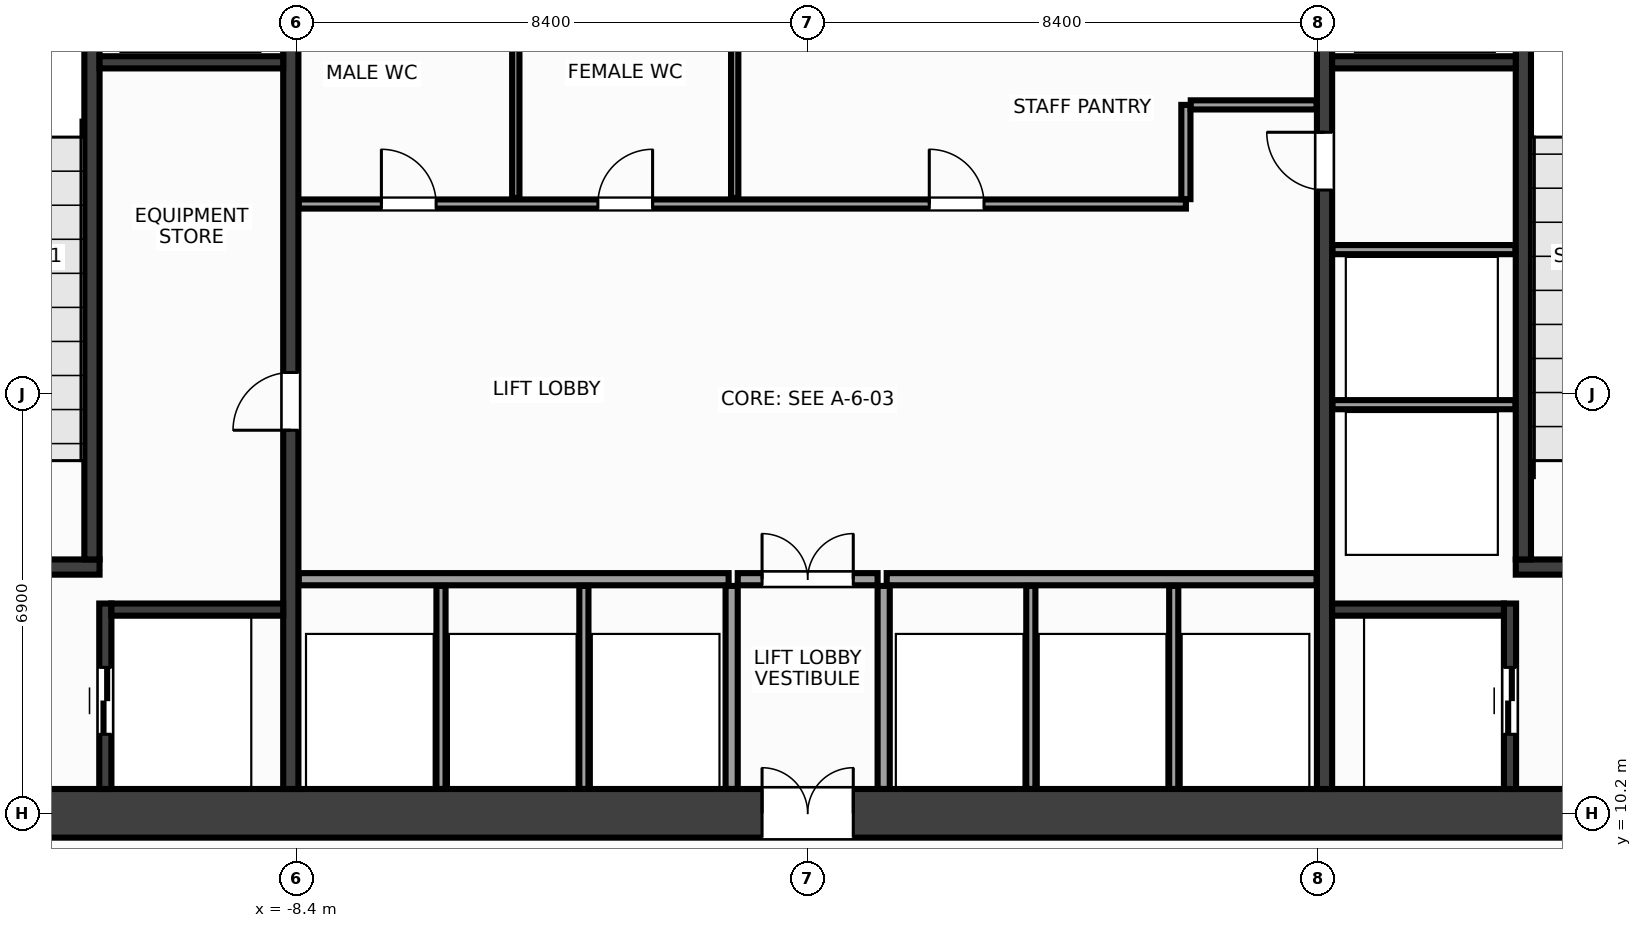
"""IFC4 building model, lengths in metres.
Left out: names, types, materials, properties, quantities, classifications, styles, units other than length and angle.
Written with IfcOpenShell. Run it as: python <this file> out.ifc"""

import sys

from ifc_helpers import new_model, si_unit, direction, frame, frame_2d, origin, place, context, subcontext, project, spatial, rectangle, extrude, source, transform, mapped, element, fill, save


model = new_model("IFC4")
c1 = context("Model", 3, precision=1e-05, world=origin(), true_north=direction((0.0, 1.0)))
c2 = subcontext(c1, "Body", "Model", "MODEL_VIEW")
j1 = project(units=[si_unit("LENGTHUNIT", "METRE"), si_unit("PLANEANGLEUNIT", "RADIAN")], contexts=[c1])
p1 = place(None, origin())
s1 = spatial("IfcSite", under=j1, at=p1, CompositionType="ELEMENT")
p2 = place(p1, origin())
s2 = spatial("IfcBuilding", under=s1, at=p2, CompositionType="ELEMENT")
p3 = place(p2, frame((0.0, 0.0, 70.4)))
s3 = spatial("IfcBuildingStorey", under=s2, at=p3, CompositionType="ELEMENT", Elevation=70.4)
m1 = source(origin(), c2, "Body", "SweptSolid", [
    extrude(rectangle(XDim=32.0, YDim=0.8, at=frame_2d((16.0, 0.0))), origin(), (0.0, 0.0, 1.0), 7.2),
])
p4 = place(p3, frame((-16.0, 10.2, 0.0), z_axis=(0.0, 0.0, 1.0), x_axis=(1.0, 0.0, 0.0)))
e1 = element("IfcWall", 1, at=p4, inside=s3, PredefinedType="SHEAR", context=c2, shape_type="MappedRepresentation", body=[
    mapped(m1, transform((0.0, 0.0, 0.0), x_axis=(1.0, 0.0, 0.0), y_axis=(0.0, 1.0, 0.0), z_axis=(0.0, 0.0, 1.0), scale=1.0)),
])
p5 = place(p4, frame((1.85, 0.0, 0.0)))
e2 = element("IfcOpeningElement", 2, at=p5, cuts=e1, PredefinedType="OPENING", context=c2, shape_type="SweptSolid", body=[
    extrude(rectangle(XDim=1.6, YDim=2.15, at=frame_2d((0.8, 1.075))), frame((0.0, 0.412, 0.0), z_axis=(0.0, -1.0, 0.0), x_axis=(1.0, 0.0, 0.0)), (0.0, 0.0, 1.0), 0.824),
])
p6 = place(p4, frame((28.55, 0.0, 0.0)))
e3 = element("IfcOpeningElement", 3, at=p6, cuts=e1, PredefinedType="OPENING", context=c2, shape_type="SweptSolid", body=[
    extrude(rectangle(XDim=1.6, YDim=2.15, at=frame_2d((0.8, 1.075))), frame((0.0, 0.412, 0.0), z_axis=(0.0, -1.0, 0.0), x_axis=(1.0, 0.0, 0.0)), (0.0, 0.0, 1.0), 0.824),
])
p7 = place(p4, frame((15.25, 0.0, 0.0)))
e4 = element("IfcOpeningElement", 4, at=p7, cuts=e1, PredefinedType="OPENING", context=c2, shape_type="SweptSolid", body=[
    extrude(rectangle(XDim=1.5, YDim=2.2, at=frame_2d((0.75, 1.1))), frame((0.0, 0.412, 0.0), z_axis=(0.0, -1.0, 0.0), x_axis=(1.0, 0.0, 0.0)), (0.0, 0.0, 1.0), 0.824),
])
m2 = source(origin(), c2, "Body", "SweptSolid", [
    extrude(rectangle(XDim=12.8, YDim=0.25, at=frame_2d((6.4, 0.0))), origin(), (0.0, 0.0, 1.0), 7.2),
])
p8 = place(p3, frame((-8.5, 10.6, 0.0), z_axis=(0.0, 0.0, 1.0), x_axis=(0.0, 1.0, 0.0)))
e5 = element("IfcWall", 5, at=p8, inside=s3, PredefinedType="SHEAR", context=c2, shape_type="MappedRepresentation", body=[
    mapped(m2, transform((0.0, 0.0, 0.0), x_axis=(1.0, 0.0, 0.0), y_axis=(0.0, 1.0, 0.0), z_axis=(0.0, 0.0, 1.0), scale=1.0)),
])
p9 = place(p8, frame((5.9, 0.0, 0.0)))
e6 = element("IfcOpeningElement", 6, at=p9, cuts=e5, PredefinedType="OPENING", context=c2, shape_type="SweptSolid", body=[
    extrude(rectangle(XDim=0.95, YDim=2.15, at=frame_2d((0.475, 1.075))), frame((0.0, 0.137, 0.0), z_axis=(0.0, -1.0, 0.0), x_axis=(1.0, 0.0, 0.0)), (0.0, 0.0, 1.0), 0.274),
])
p10 = place(p3, frame((8.5, 10.6, 0.0), z_axis=(0.0, 0.0, 1.0), x_axis=(0.0, 1.0, 0.0)))
e7 = element("IfcWall", 7, at=p10, inside=s3, PredefinedType="SHEAR", context=c2, shape_type="MappedRepresentation", body=[
    mapped(m2, transform((0.0, 0.0, 0.0), x_axis=(1.0, 0.0, 0.0), y_axis=(0.0, 1.0, 0.0), z_axis=(0.0, 0.0, 1.0), scale=1.0)),
])
p11 = place(p10, frame((9.85, 0.0, 0.0)))
e8 = element("IfcOpeningElement", 8, at=p11, cuts=e7, PredefinedType="OPENING", context=c2, shape_type="SweptSolid", body=[
    extrude(rectangle(XDim=0.95, YDim=2.15, at=frame_2d((0.475, 1.075))), frame((0.0, 0.137, 0.0), z_axis=(0.0, -1.0, 0.0), x_axis=(1.0, 0.0, 0.0)), (0.0, 0.0, 1.0), 0.274),
])
m3 = source(origin(), c2, "Body", "SweptSolid", [
    extrude(rectangle(XDim=3.555, YDim=0.25, at=frame_2d((1.777, 0.0))), origin(), (0.0, 0.0, 1.0), 7.2),
])
p12 = place(p3, frame((-15.2, 14.25, 0.0), z_axis=(0.0, 0.0, 1.0), x_axis=(1.0, 0.0, 0.0)))
e9 = element("IfcWall", 9, at=p12, inside=s3, PredefinedType="SHEAR", context=c2, shape_type="MappedRepresentation", body=[
    mapped(m3, transform((0.0, 0.0, 0.0), x_axis=(1.0, 0.0, 0.0), y_axis=(0.0, 1.0, 0.0), z_axis=(0.0, 0.0, 1.0), scale=1.0)),
])
p13 = place(p12, frame((0.95, 0.0, 0.0)))
e10 = element("IfcOpeningElement", 10, at=p13, cuts=e9, PredefinedType="OPENING", context=c2, shape_type="SweptSolid", body=[
    extrude(rectangle(XDim=1.6, YDim=2.15, at=frame_2d((0.8, 1.075))), frame((0.0, 0.137, 0.0), z_axis=(0.0, -1.0, 0.0), x_axis=(1.0, 0.0, 0.0)), (0.0, 0.0, 1.0), 0.274),
])
m4 = source(origin(), c2, "Body", "SweptSolid", [
    extrude(rectangle(XDim=9.025, YDim=0.25, at=frame_2d((4.512, 0.0))), origin(), (0.0, 0.0, 1.0), 7.2),
])
p14 = place(p3, frame((-11.77, 14.375, 0.0), z_axis=(0.0, 0.0, 1.0), x_axis=(0.0, 1.0, 0.0)))
e11 = element("IfcWall", 11, at=p14, inside=s3, PredefinedType="SHEAR", context=c2, shape_type="MappedRepresentation", body=[
    mapped(m4, transform((0.0, 0.0, 0.0), x_axis=(1.0, 0.0, 0.0), y_axis=(0.0, 1.0, 0.0), z_axis=(0.0, 0.0, 1.0), scale=1.0)),
])
p15 = place(p3, frame((11.645, 14.25, 0.0), z_axis=(0.0, 0.0, 1.0), x_axis=(1.0, 0.0, 0.0)))
e12 = element("IfcWall", 12, at=p15, inside=s3, PredefinedType="SHEAR", context=c2, shape_type="MappedRepresentation", body=[
    mapped(m3, transform((0.0, 0.0, 0.0), x_axis=(1.0, 0.0, 0.0), y_axis=(0.0, 1.0, 0.0), z_axis=(0.0, 0.0, 1.0), scale=1.0)),
])
p16 = place(p15, frame((0.95, 0.0, 0.0)))
e13 = element("IfcOpeningElement", 13, at=p16, cuts=e12, PredefinedType="OPENING", context=c2, shape_type="SweptSolid", body=[
    extrude(rectangle(XDim=1.6, YDim=2.15, at=frame_2d((0.8, 1.075))), frame((0.0, 0.137, 0.0), z_axis=(0.0, -1.0, 0.0), x_axis=(1.0, 0.0, 0.0)), (0.0, 0.0, 1.0), 0.274),
])
p17 = place(p3, frame((11.77, 14.375, 0.0), z_axis=(0.0, 0.0, 1.0), x_axis=(0.0, 1.0, 0.0)))
e14 = element("IfcWall", 14, at=p17, inside=s3, PredefinedType="SHEAR", context=c2, shape_type="MappedRepresentation", body=[
    mapped(m4, transform((0.0, 0.0, 0.0), x_axis=(1.0, 0.0, 0.0), y_axis=(0.0, 1.0, 0.0), z_axis=(0.0, 0.0, 1.0), scale=1.0)),
])
m5 = source(origin(), c2, "Body", "SweptSolid", [
    extrude(rectangle(XDim=3.05, YDim=0.2, at=frame_2d((1.525, 0.0))), origin(), (0.0, 0.0, 1.0), 7.2),
])
p18 = place(p3, frame((-11.55, 10.6, 0.0), z_axis=(0.0, 0.0, 1.0), x_axis=(0.0, 1.0, 0.0)))
e15 = element("IfcWall", 15, at=p18, inside=s3, PredefinedType="SHEAR", context=c2, shape_type="MappedRepresentation", body=[
    mapped(m5, transform((0.0, 0.0, 0.0), x_axis=(1.0, 0.0, 0.0), y_axis=(0.0, 1.0, 0.0), z_axis=(0.0, 0.0, 1.0), scale=1.0)),
])
p19 = place(p18, frame((0.9, 0.0, 0.0)))
e16 = element("IfcOpeningElement", 16, at=p19, cuts=e15, PredefinedType="OPENING", context=c2, shape_type="SweptSolid", body=[
    extrude(rectangle(XDim=1.1, YDim=2.15, at=frame_2d((0.55, 1.075))), frame((0.0, 0.112, 0.0), z_axis=(0.0, -1.0, 0.0), x_axis=(1.0, 0.0, 0.0)), (0.0, 0.0, 1.0), 0.224),
])
m6 = source(origin(), c2, "Body", "SweptSolid", [
    extrude(rectangle(XDim=2.825, YDim=0.2, at=frame_2d((1.413, 0.0))), origin(), (0.0, 0.0, 1.0), 7.2),
])
p20 = place(p3, frame((-11.45, 13.55, 0.0), z_axis=(0.0, 0.0, 1.0), x_axis=(1.0, 0.0, 0.0)))
e17 = element("IfcWall", 17, at=p20, inside=s3, PredefinedType="SHEAR", context=c2, shape_type="MappedRepresentation", body=[
    mapped(m6, transform((0.0, 0.0, 0.0), x_axis=(1.0, 0.0, 0.0), y_axis=(0.0, 1.0, 0.0), z_axis=(0.0, 0.0, 1.0), scale=1.0)),
])
p21 = place(p3, frame((11.55, 10.6, 0.0), z_axis=(0.0, 0.0, 1.0), x_axis=(0.0, 1.0, 0.0)))
e18 = element("IfcWall", 18, at=p21, inside=s3, PredefinedType="SHEAR", context=c2, shape_type="MappedRepresentation", body=[
    mapped(m5, transform((0.0, 0.0, 0.0), x_axis=(1.0, 0.0, 0.0), y_axis=(0.0, 1.0, 0.0), z_axis=(0.0, 0.0, 1.0), scale=1.0)),
])
p22 = place(p21, frame((0.9, 0.0, 0.0)))
e19 = element("IfcOpeningElement", 19, at=p22, cuts=e18, PredefinedType="OPENING", context=c2, shape_type="SweptSolid", body=[
    extrude(rectangle(XDim=1.1, YDim=2.15, at=frame_2d((0.55, 1.075))), frame((0.0, 0.112, 0.0), z_axis=(0.0, -1.0, 0.0), x_axis=(1.0, 0.0, 0.0)), (0.0, 0.0, 1.0), 0.224),
])
p23 = place(p3, frame((8.625, 13.55, 0.0), z_axis=(0.0, 0.0, 1.0), x_axis=(1.0, 0.0, 0.0)))
e20 = element("IfcWall", 20, at=p23, inside=s3, PredefinedType="SHEAR", context=c2, shape_type="MappedRepresentation", body=[
    mapped(m6, transform((0.0, 0.0, 0.0), x_axis=(1.0, 0.0, 0.0), y_axis=(0.0, 1.0, 0.0), z_axis=(0.0, 0.0, 1.0), scale=1.0)),
])
m7 = source(origin(), c2, "Body", "SweptSolid", [
    extrude(rectangle(XDim=3.02, YDim=0.2, at=frame_2d((1.51, 0.0))), origin(), (0.0, 0.0, 1.0), 7.2),
])
for number, where, z_axis, x_axis in (
    (21, (-11.645, 22.55, 0.0), (0.0, 0.0, 1.0), (1.0, 0.0, 0.0)),
    (22, (8.625, 22.55, 0.0), (0.0, 0.0, 1.0), (1.0, 0.0, 0.0)),
):
    element("IfcWall", number, at=place(p3, frame(where, z_axis=z_axis, x_axis=x_axis)), inside=s3, PredefinedType="SHEAR", context=c2, shape_type="MappedRepresentation", body=[
        mapped(m7, transform((0.0, 0.0, 0.0), x_axis=(1.0, 0.0, 0.0), y_axis=(0.0, 1.0, 0.0), z_axis=(0.0, 0.0, 1.0), scale=1.0)),
    ])
m8 = source(origin(), c2, "Body", "SweptSolid", [
    extrude(rectangle(XDim=3.01, YDim=0.15, at=frame_2d((1.505, 0.0))), origin(), (0.0, 0.0, 1.0), 6.9),
])
for number, where, z_axis, x_axis in (
    (23, (8.63, 16.92, 0.0), (0.0, 0.0, 1.0), (1.0, 0.0, 0.0)),
    (24, (8.63, 19.47, 0.0), (0.0, 0.0, 1.0), (1.0, 0.0, 0.0)),
):
    element("IfcWall", number, at=place(p3, frame(where, z_axis=z_axis, x_axis=x_axis)), inside=s3, PredefinedType="PARTITIONING", context=c2, shape_type="MappedRepresentation", body=[
        mapped(m8, transform((0.0, 0.0, 0.0), x_axis=(1.0, 0.0, 0.0), y_axis=(0.0, 1.0, 0.0), z_axis=(0.0, 0.0, 1.0), scale=1.0)),
    ])
m9 = source(origin(), c2, "Body", "SweptSolid", [
    extrude(rectangle(XDim=7.07, YDim=0.2, at=frame_2d((3.535, 0.0))), origin(), (0.0, 0.0, 1.0), 6.9),
])
for number, where, z_axis, x_axis in (
    (25, (-8.37, 14.05, 0.0), (0.0, 0.0, 1.0), (1.0, 0.0, 0.0)),
    (26, (1.3, 14.05, 0.0), (0.0, 0.0, 1.0), (1.0, 0.0, 0.0)),
):
    element("IfcWall", number, at=place(p3, frame(where, z_axis=z_axis, x_axis=x_axis)), inside=s3, PredefinedType="PARTITIONING", context=c2, shape_type="MappedRepresentation", body=[
        mapped(m9, transform((0.0, 0.0, 0.0), x_axis=(1.0, 0.0, 0.0), y_axis=(0.0, 1.0, 0.0), z_axis=(0.0, 0.0, 1.0), scale=1.0)),
    ])
m10 = source(origin(), c2, "Body", "SweptSolid", [
    extrude(rectangle(XDim=3.34, YDim=0.2, at=frame_2d((1.67, 0.0))), origin(), (0.0, 0.0, 1.0), 6.9),
])
for number, where, z_axis, x_axis in (
    (27, (-1.25, 10.6, 0.0), (0.0, 0.0, 1.0), (0.0, 1.0, 0.0)),
    (28, (1.25, 10.6, 0.0), (0.0, 0.0, 1.0), (0.0, 1.0, 0.0)),
):
    element("IfcWall", number, at=place(p3, frame(where, z_axis=z_axis, x_axis=x_axis)), inside=s3, PredefinedType="PARTITIONING", context=c2, shape_type="MappedRepresentation", body=[
        mapped(m10, transform((0.0, 0.0, 0.0), x_axis=(1.0, 0.0, 0.0), y_axis=(0.0, 1.0, 0.0), z_axis=(0.0, 0.0, 1.0), scale=1.0)),
    ])
m11 = source(origin(), c2, "Body", "SweptSolid", [
    extrude(rectangle(XDim=2.3, YDim=0.2, at=frame_2d((1.15, 0.0))), origin(), (0.0, 0.0, 1.0), 6.9),
])
p24 = place(p3, frame((-1.15, 14.05, 0.0), z_axis=(0.0, 0.0, 1.0), x_axis=(1.0, 0.0, 0.0)))
e29 = element("IfcWall", 29, at=p24, inside=s3, PredefinedType="PARTITIONING", context=c2, shape_type="MappedRepresentation", body=[
    mapped(m11, transform((0.0, 0.0, 0.0), x_axis=(1.0, 0.0, 0.0), y_axis=(0.0, 1.0, 0.0), z_axis=(0.0, 0.0, 1.0), scale=1.0)),
])
p25 = place(p24, frame((0.4, 0.0, 0.0)))
e30 = element("IfcOpeningElement", 30, at=p25, cuts=e29, PredefinedType="OPENING", context=c2, shape_type="SweptSolid", body=[
    extrude(rectangle(XDim=1.5, YDim=2.2, at=frame_2d((0.75, 1.1))), frame((0.0, 0.112, 0.0), z_axis=(0.0, -1.0, 0.0), x_axis=(1.0, 0.0, 0.0)), (0.0, 0.0, 1.0), 0.224),
])
m12 = source(origin(), c2, "Body", "SweptSolid", [
    extrude(rectangle(XDim=14.59, YDim=0.15, at=frame_2d((7.295, 0.0))), origin(), (0.0, 0.0, 1.0), 6.9),
])
p26 = place(p3, frame((-8.37, 20.22, 0.0), z_axis=(0.0, 0.0, 1.0), x_axis=(1.0, 0.0, 0.0)))
e31 = element("IfcWall", 31, at=p26, inside=s3, PredefinedType="PARTITIONING", context=c2, shape_type="MappedRepresentation", body=[
    mapped(m12, transform((0.0, 0.0, 0.0), x_axis=(1.0, 0.0, 0.0), y_axis=(0.0, 1.0, 0.0), z_axis=(0.0, 0.0, 1.0), scale=1.0)),
])
p27 = place(p26, frame((1.36, 0.0, 0.0)))
e32 = element("IfcOpeningElement", 32, at=p27, cuts=e31, PredefinedType="OPENING", context=c2, shape_type="SweptSolid", body=[
    extrude(rectangle(XDim=0.9, YDim=2.15, at=frame_2d((0.45, 1.075))), frame((0.0, 0.087, 0.0), z_axis=(0.0, -1.0, 0.0), x_axis=(1.0, 0.0, 0.0)), (0.0, 0.0, 1.0), 0.174),
])
p28 = place(p26, frame((4.92, 0.0, 0.0)))
e33 = element("IfcOpeningElement", 33, at=p28, cuts=e31, PredefinedType="OPENING", context=c2, shape_type="SweptSolid", body=[
    extrude(rectangle(XDim=0.9, YDim=2.15, at=frame_2d((0.45, 1.075))), frame((0.0, 0.087, 0.0), z_axis=(0.0, -1.0, 0.0), x_axis=(1.0, 0.0, 0.0)), (0.0, 0.0, 1.0), 0.174),
])
p29 = place(p26, frame((10.37, 0.0, 0.0)))
e34 = element("IfcOpeningElement", 34, at=p29, cuts=e31, PredefinedType="OPENING", context=c2, shape_type="SweptSolid", body=[
    extrude(rectangle(XDim=0.9, YDim=2.15, at=frame_2d((0.45, 1.075))), frame((0.0, 0.087, 0.0), z_axis=(0.0, -1.0, 0.0), x_axis=(1.0, 0.0, 0.0)), (0.0, 0.0, 1.0), 0.174),
])
m13 = source(origin(), c2, "Body", "SweptSolid", [
    extrude(rectangle(XDim=1.55, YDim=0.15, at=frame_2d((0.775, 0.0))), origin(), (0.0, 0.0, 1.0), 6.9),
])
p30 = place(p3, frame((6.22, 20.3, 0.0), z_axis=(0.0, 0.0, 1.0), x_axis=(0.0, 1.0, 0.0)))
e35 = element("IfcWall", 35, at=p30, inside=s3, PredefinedType="PARTITIONING", context=c2, shape_type="MappedRepresentation", body=[
    mapped(m13, transform((0.0, 0.0, 0.0), x_axis=(1.0, 0.0, 0.0), y_axis=(0.0, 1.0, 0.0), z_axis=(0.0, 0.0, 1.0), scale=1.0)),
])
m14 = source(origin(), c2, "Body", "SweptSolid", [
    extrude(rectangle(XDim=2.07, YDim=0.15, at=frame_2d((1.035, 0.0))), origin(), (0.0, 0.0, 1.0), 6.9),
])
p31 = place(p3, frame((6.3, 21.85, 0.0), z_axis=(0.0, 0.0, 1.0), x_axis=(1.0, 0.0, 0.0)))
e36 = element("IfcWall", 36, at=p31, inside=s3, PredefinedType="PARTITIONING", context=c2, shape_type="MappedRepresentation", body=[
    mapped(m14, transform((0.0, 0.0, 0.0), x_axis=(1.0, 0.0, 0.0), y_axis=(0.0, 1.0, 0.0), z_axis=(0.0, 0.0, 1.0), scale=1.0)),
])
m15 = source(origin(), c2, "Body", "SweptSolid", [
    extrude(rectangle(XDim=3.34, YDim=0.15, at=frame_2d((1.67, 0.0))), origin(), (0.0, 0.0, 1.0), 6.9),
])
for number, where, z_axis, x_axis in (
    (37, (-6.03, 10.6, 0.0), (0.0, 0.0, 1.0), (0.0, 1.0, 0.0)),
    (38, (-3.68, 10.6, 0.0), (0.0, 0.0, 1.0), (0.0, 1.0, 0.0)),
    (39, (3.67, 10.6, 0.0), (0.0, 0.0, 1.0), (0.0, 1.0, 0.0)),
    (40, (6.02, 10.6, 0.0), (0.0, 0.0, 1.0), (0.0, 1.0, 0.0)),
):
    element("IfcWall", number, at=place(p3, frame(where, z_axis=z_axis, x_axis=x_axis)), inside=s3, PredefinedType="PARTITIONING", context=c2, shape_type="MappedRepresentation", body=[
        mapped(m15, transform((0.0, 0.0, 0.0), x_axis=(1.0, 0.0, 0.0), y_axis=(0.0, 1.0, 0.0), z_axis=(0.0, 0.0, 1.0), scale=1.0)),
    ])
m16 = source(origin(), c2, "Body", "SweptSolid", [
    extrude(rectangle(XDim=3.04, YDim=0.12, at=frame_2d((1.52, 0.0))), origin(), (0.0, 0.0, 1.0), 6.9),
])
for number, where, z_axis, x_axis in (
    (41, (-4.8, 20.32, 0.0), (0.0, 0.0, 1.0), (0.0, 1.0, 0.0)),
    (42, (-1.2, 20.32, 0.0), (0.0, 0.0, 1.0), (0.0, 1.0, 0.0)),
):
    element("IfcWall", number, at=place(p3, frame(where, z_axis=z_axis, x_axis=x_axis)), inside=s3, PredefinedType="PARTITIONING", context=c2, shape_type="MappedRepresentation", body=[
        mapped(m16, transform((0.0, 0.0, 0.0), x_axis=(1.0, 0.0, 0.0), y_axis=(0.0, 1.0, 0.0), z_axis=(0.0, 0.0, 1.0), scale=1.0)),
    ])
m17 = source(origin(), c2, "Body", "SweptSolid", [
    extrude(rectangle(XDim=1.1, YDim=2.15, at=frame_2d((0.55, 1.075))), frame((0.0, 0.025, 0.0), z_axis=(0.0, -1.0, 0.0), x_axis=(1.0, 0.0, 0.0)), (0.0, 0.0, 1.0), 0.05),
])
p32 = place(p19, origin())
e43 = element("IfcDoor", 43, at=p32, inside=s3, OperationType="DOUBLE_DOOR_SLIDING", PredefinedType="DOOR", context=c2, shape_type="MappedRepresentation", body=[
    mapped(m17, transform((0.0, 0.0, 0.0), x_axis=(1.0, 0.0, 0.0), y_axis=(0.0, 1.0, 0.0), z_axis=(0.0, 0.0, 1.0), scale=1.0)),
])
fill(e16, e43)
p33 = place(p22, origin())
e44 = element("IfcDoor", 44, at=p33, inside=s3, OperationType="DOUBLE_DOOR_SLIDING", PredefinedType="DOOR", context=c2, shape_type="MappedRepresentation", body=[
    mapped(m17, transform((0.0, 0.0, 0.0), x_axis=(1.0, 0.0, 0.0), y_axis=(0.0, 1.0, 0.0), z_axis=(0.0, 0.0, 1.0), scale=1.0)),
])
fill(e19, e44)
m18 = source(origin(), c2, "Body", "SweptSolid", [
    extrude(rectangle(XDim=0.95, YDim=2.15, at=frame_2d((0.475, 1.075))), frame((0.0, 0.025, 0.0), z_axis=(0.0, -1.0, 0.0), x_axis=(1.0, 0.0, 0.0)), (0.0, 0.0, 1.0), 0.05),
])
p34 = place(p9, origin())
e45 = element("IfcDoor", 45, at=p34, inside=s3, OperationType="SINGLE_SWING_LEFT", PredefinedType="DOOR", context=c2, shape_type="MappedRepresentation", body=[
    mapped(m18, transform((0.0, 0.0, 0.0), x_axis=(1.0, 0.0, 0.0), y_axis=(0.0, 1.0, 0.0), z_axis=(0.0, 0.0, 1.0), scale=1.0)),
])
fill(e6, e45)
m19 = source(origin(), c2, "Body", "SweptSolid", [
    extrude(rectangle(XDim=0.95, YDim=2.15, at=frame_2d((0.475, 1.075))), frame((0.0, 0.025, 0.0), z_axis=(0.0, -1.0, 0.0), x_axis=(1.0, 0.0, 0.0)), (0.0, 0.0, 1.0), 0.05),
])
p35 = place(p11, origin())
e46 = element("IfcDoor", 46, at=p35, inside=s3, OperationType="SINGLE_SWING_RIGHT", PredefinedType="DOOR", context=c2, shape_type="MappedRepresentation", body=[
    mapped(m19, transform((0.0, 0.0, 0.0), x_axis=(1.0, 0.0, 0.0), y_axis=(0.0, 1.0, 0.0), z_axis=(0.0, 0.0, 1.0), scale=1.0)),
])
fill(e8, e46)
m20 = source(origin(), c2, "Body", "SweptSolid", [
    extrude(rectangle(XDim=1.5, YDim=2.2, at=frame_2d((0.75, 1.1))), frame((0.0, 0.025, 0.0), z_axis=(0.0, -1.0, 0.0), x_axis=(1.0, 0.0, 0.0)), (0.0, 0.0, 1.0), 0.05),
])
p36 = place(p25, origin())
e47 = element("IfcDoor", 47, at=p36, inside=s3, OperationType="DOUBLE_DOOR_SINGLE_SWING", PredefinedType="DOOR", context=c2, shape_type="MappedRepresentation", body=[
    mapped(m20, transform((0.0, 0.0, 0.0), x_axis=(1.0, 0.0, 0.0), y_axis=(0.0, 1.0, 0.0), z_axis=(0.0, 0.0, 1.0), scale=1.0)),
])
fill(e30, e47)
p37 = place(p7, origin())
e48 = element("IfcDoor", 48, at=p37, inside=s3, OperationType="DOUBLE_DOOR_SINGLE_SWING", PredefinedType="DOOR", context=c2, shape_type="MappedRepresentation", body=[
    mapped(m20, transform((0.0, 0.0, 0.0), x_axis=(1.0, 0.0, 0.0), y_axis=(0.0, 1.0, 0.0), z_axis=(0.0, 0.0, 1.0), scale=1.0)),
])
fill(e4, e48)
m21 = source(origin(), c2, "Body", "SweptSolid", [
    extrude(rectangle(XDim=0.9, YDim=2.15, at=frame_2d((0.45, 1.075))), frame((0.0, 0.025, 0.0), z_axis=(0.0, -1.0, 0.0), x_axis=(1.0, 0.0, 0.0)), (0.0, 0.0, 1.0), 0.05),
])
p38 = place(p27, origin())
e49 = element("IfcDoor", 49, at=p38, inside=s3, OperationType="SINGLE_SWING_LEFT", PredefinedType="DOOR", context=c2, shape_type="MappedRepresentation", body=[
    mapped(m21, transform((0.0, 0.0, 0.0), x_axis=(1.0, 0.0, 0.0), y_axis=(0.0, 1.0, 0.0), z_axis=(0.0, 0.0, 1.0), scale=1.0)),
])
fill(e32, e49)
p39 = place(p28, origin())
e50 = element("IfcDoor", 50, at=p39, inside=s3, OperationType="SINGLE_SWING_RIGHT", PredefinedType="DOOR", context=c2, shape_type="MappedRepresentation", body=[
    mapped(m21, transform((0.0, 0.0, 0.0), x_axis=(1.0, 0.0, 0.0), y_axis=(0.0, 1.0, 0.0), z_axis=(0.0, 0.0, 1.0), scale=1.0)),
])
fill(e33, e50)
p40 = place(p29, origin())
e51 = element("IfcDoor", 51, at=p40, inside=s3, OperationType="SINGLE_SWING_LEFT", PredefinedType="DOOR", context=c2, shape_type="MappedRepresentation", body=[
    mapped(m21, transform((0.0, 0.0, 0.0), x_axis=(1.0, 0.0, 0.0), y_axis=(0.0, 1.0, 0.0), z_axis=(0.0, 0.0, 1.0), scale=1.0)),
])
fill(e34, e51)
save(model, sys.argv[1])
